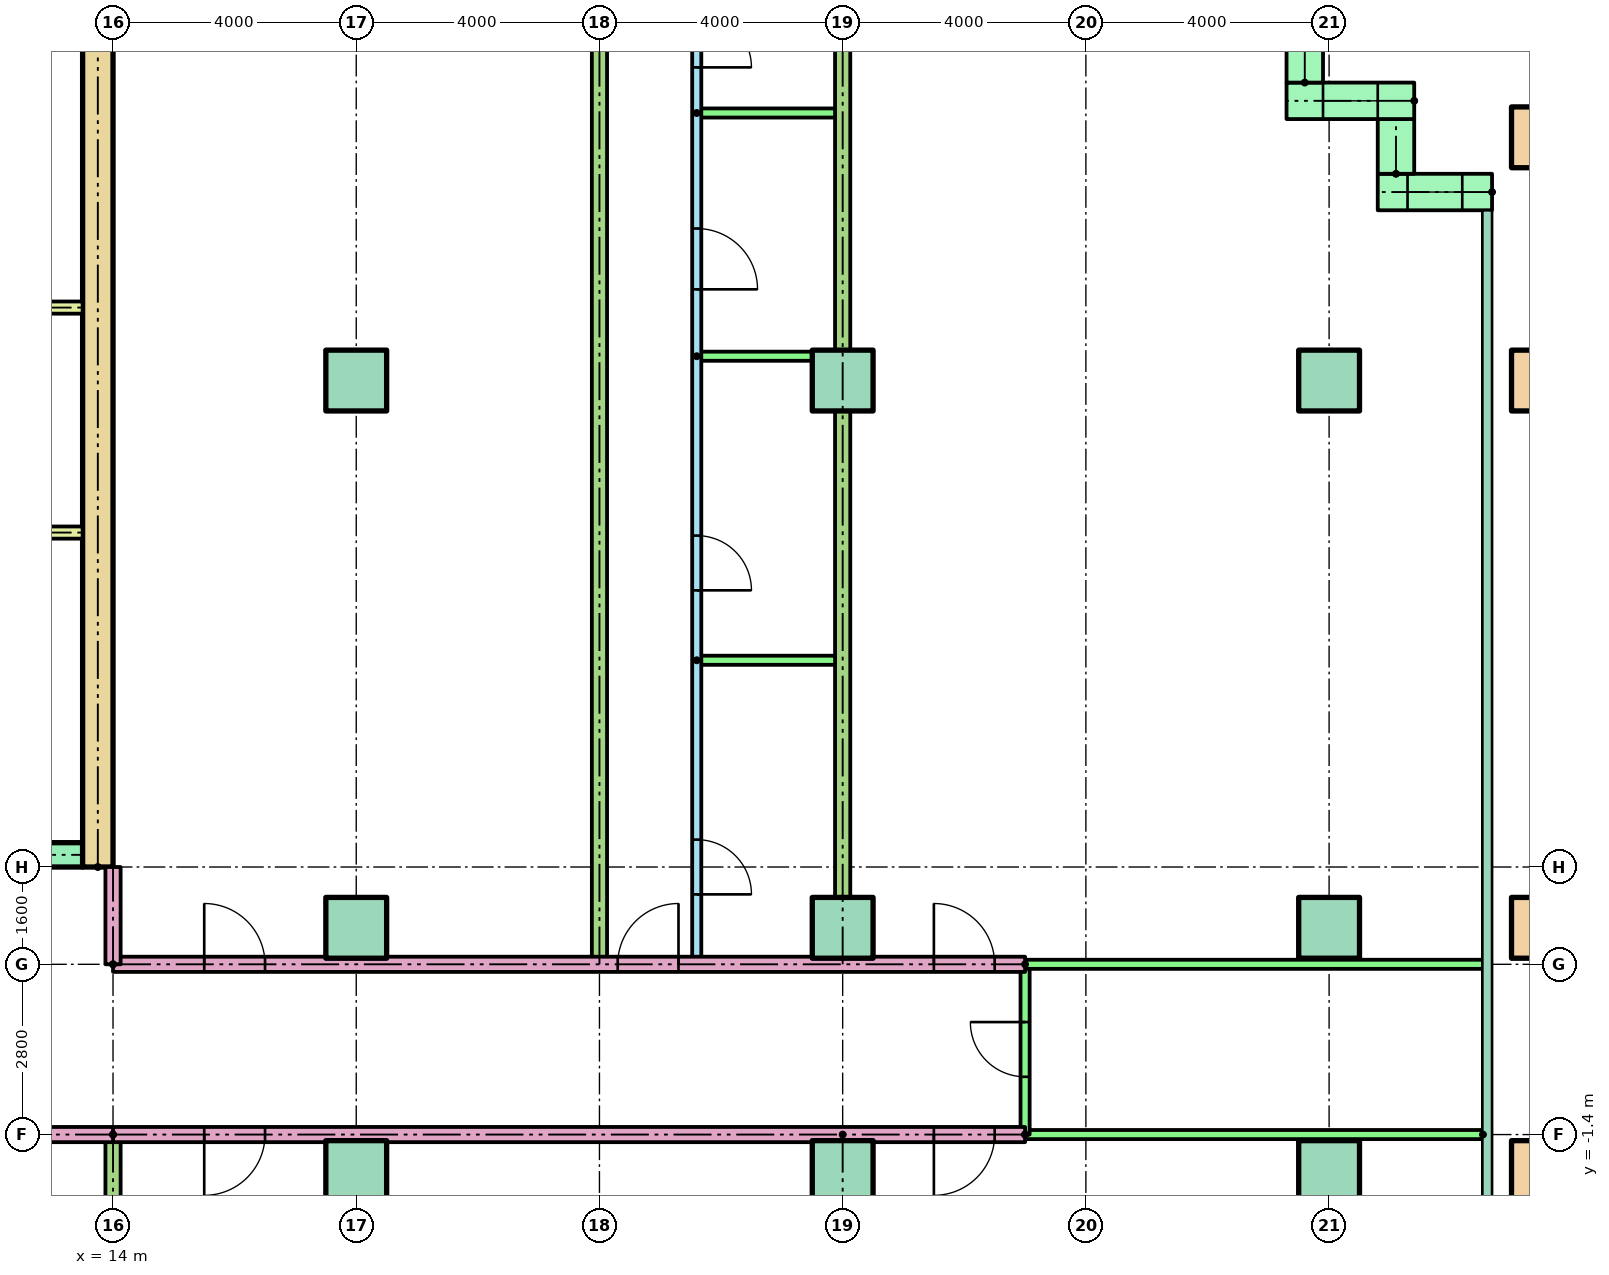
"""IFC4 building model, lengths in metres.
Left out: names, types, materials, properties, quantities, classifications, styles, units other than length and angle.
Written with IfcOpenShell. Run it as: python <this file> out.ifc"""

import sys

from ifc_helpers import new_model, si_unit, direction, frame, frame_2d, origin, origin_2d, place, context, subcontext, project, spatial, rectangle, hollow_rectangle, extrude, element, fill, save


model = new_model("IFC4")
c1 = context("Model", 3, precision=1e-05, world=origin(), true_north=direction((0.0, 1.0)))
c2 = subcontext(c1, "Body", "Model", "MODEL_VIEW")
j1 = project(units=[si_unit("LENGTHUNIT", "METRE"), si_unit("PLANEANGLEUNIT", "RADIAN")], contexts=[c1])
p1 = place(None, origin())
s1 = spatial("IfcSite", under=j1, at=p1, CompositionType="ELEMENT")
p2 = place(p1, origin())
s2 = spatial("IfcBuilding", under=s1, at=p2, CompositionType="ELEMENT")
p3 = place(p2, frame((0.0, 0.0, 33.8)))
s3 = spatial("IfcBuildingStorey", under=s2, at=p3, CompositionType="ELEMENT", Elevation=33.8)
for number, where in (
    (1, (18.0, -2.0, 0.0)),
    (2, (26.0, -2.0, 0.0)),
    (3, (34.0, -2.0, 0.0)),
):
    element("IfcColumn", number, at=place(p3, frame(where)), inside=s3, PredefinedType="COLUMN", context=c2, shape_type="SweptSolid", body=[
        extrude(rectangle(XDim=1.0, YDim=1.0, at=origin_2d()), origin(), (0.0, 0.0, 1.0), 3.9),
    ])
p4 = place(p3, frame((37.5, -2.0, 0.0)))
e4 = element("IfcColumn", 4, at=p4, inside=s3, PredefinedType="COLUMN", context=c2, shape_type="SweptSolid", body=[
    extrude(hollow_rectangle(XDim=1.0, YDim=1.0, WallThickness=0.05, at=origin_2d()), origin(), (0.0, 0.0, 1.0), 3.9),
])
for number, where in (
    (5, (18.0, 2.0, 0.0)),
    (6, (26.0, 2.0, 0.0)),
    (7, (34.0, 2.0, 0.0)),
):
    element("IfcColumn", number, at=place(p3, frame(where)), inside=s3, PredefinedType="COLUMN", context=c2, shape_type="SweptSolid", body=[
        extrude(rectangle(XDim=1.0, YDim=1.0, at=origin_2d()), origin(), (0.0, 0.0, 1.0), 3.9),
    ])
p5 = place(p3, frame((37.5, 2.0, 0.0)))
e8 = element("IfcColumn", 8, at=p5, inside=s3, PredefinedType="COLUMN", context=c2, shape_type="SweptSolid", body=[
    extrude(hollow_rectangle(XDim=1.0, YDim=1.0, WallThickness=0.05, at=origin_2d()), origin(), (0.0, 0.0, 1.0), 3.9),
])
for number, where in (
    (9, (18.0, 11.0, 0.0)),
    (10, (26.0, 11.0, 0.0)),
    (11, (34.0, 11.0, 0.0)),
):
    element("IfcColumn", number, at=place(p3, frame(where)), inside=s3, PredefinedType="COLUMN", context=c2, shape_type="SweptSolid", body=[
        extrude(rectangle(XDim=1.0, YDim=1.0, at=origin_2d()), origin(), (0.0, 0.0, 1.0), 3.9),
    ])
for number, where in (
    (12, (37.5, 11.0, 0.0)),
    (13, (37.5, 15.0, 0.0)),
):
    element("IfcColumn", number, at=place(p3, frame(where)), inside=s3, PredefinedType="COLUMN", context=c2, shape_type="SweptSolid", body=[
        extrude(hollow_rectangle(XDim=1.0, YDim=1.0, WallThickness=0.05, at=origin_2d()), origin(), (0.0, 0.0, 1.0), 3.9),
    ])
p6 = place(p3, frame((36.68, 14.1, 0.0), z_axis=(0.0, 0.0, 1.0), x_axis=(-1.0, 0.0, 0.0)))
e14 = element("IfcWall", 14, at=p6, inside=s3, PredefinedType="STANDARD", context=c2, shape_type="SweptSolid", body=[
    extrude(rectangle(XDim=1.88, YDim=0.6, at=frame_2d((0.94, 0.0))), origin(), (0.0, 0.0, 1.0), 3.6),
])
p7 = place(p6, frame((0.49, 0.0, 0.9)))
e15 = element("IfcOpeningElement", 15, at=p7, cuts=e14, PredefinedType="OPENING", context=c2, shape_type="SweptSolid", body=[
    extrude(rectangle(XDim=0.9, YDim=1.8, at=frame_2d((0.45, 0.9))), frame((0.0, 0.31, 0.0), z_axis=(0.0, -1.0, 0.0), x_axis=(1.0, 0.0, 0.0)), (0.0, 0.0, 1.0), 0.62),
])
p8 = place(p3, frame((35.1, 14.4, 0.0), z_axis=(0.0, 0.0, 1.0), x_axis=(0.0, 1.0, 0.0)))
e16 = element("IfcWall", 16, at=p8, inside=s3, PredefinedType="STANDARD", context=c2, shape_type="SweptSolid", body=[
    extrude(rectangle(XDim=0.9, YDim=0.6, at=frame_2d((0.45, 0.0))), origin(), (0.0, 0.0, 1.0), 3.6),
])
p9 = place(p3, frame((35.4, 15.6, 0.0), z_axis=(0.0, 0.0, 1.0), x_axis=(-1.0, 0.0, 0.0)))
e17 = element("IfcWall", 17, at=p9, inside=s3, PredefinedType="STANDARD", context=c2, shape_type="SweptSolid", body=[
    extrude(rectangle(XDim=2.1, YDim=0.6, at=frame_2d((1.05, 0.0))), origin(), (0.0, 0.0, 1.0), 3.6),
])
p10 = place(p9, frame((0.6, 0.0, 0.9)))
e18 = element("IfcOpeningElement", 18, at=p10, cuts=e17, PredefinedType="OPENING", context=c2, shape_type="SweptSolid", body=[
    extrude(rectangle(XDim=0.9, YDim=1.8, at=frame_2d((0.45, 0.9))), frame((0.0, 0.31, 0.0), z_axis=(0.0, -1.0, 0.0), x_axis=(1.0, 0.0, 0.0)), (0.0, 0.0, 1.0), 0.62),
])
p11 = place(p3, frame((33.6, 15.9, 0.0), z_axis=(0.0, 0.0, 1.0), x_axis=(0.0, 1.0, 0.0)))
e19 = element("IfcWall", 19, at=p11, inside=s3, PredefinedType="STANDARD", context=c2, shape_type="SweptSolid", body=[
    extrude(rectangle(XDim=0.9, YDim=0.6, at=frame_2d((0.45, 0.0))), origin(), (0.0, 0.0, 1.0), 3.6),
])
p12 = place(p3, frame((13.75, 3.0, 0.0), z_axis=(0.0, 0.0, 1.0), x_axis=(0.0, 1.0, 0.0)))
e20 = element("IfcWall", 20, at=p12, inside=s3, PredefinedType="SHEAR", context=c2, shape_type="SweptSolid", body=[
    extrude(rectangle(XDim=17.0, YDim=0.5, at=frame_2d((8.5, 0.0))), origin(), (0.0, 0.0, 1.0), 3.6),
])
p13 = place(p3, frame((-13.5, 3.2, 0.0)))
e21 = element("IfcWall", 21, at=p13, inside=s3, PredefinedType="SHEAR", context=c2, shape_type="SweptSolid", body=[
    extrude(rectangle(XDim=27.0, YDim=0.4, at=frame_2d((13.5, 0.0))), origin(), (0.0, 0.0, 1.0), 3.6),
])
p14 = place(p13, frame((6.861, 0.0, 0.0)))
e22 = element("IfcOpeningElement", 22, at=p14, cuts=e21, PredefinedType="OPENING", context=c2, shape_type="SweptSolid", body=[
    extrude(rectangle(XDim=1.1, YDim=2.1, at=frame_2d((0.55, 1.05))), frame((0.0, 0.21, 0.0), z_axis=(0.0, -1.0, 0.0), x_axis=(1.0, 0.0, 0.0)), (0.0, 0.0, 1.0), 0.42),
])
p15 = place(p13, frame((9.906, 0.0, 0.0)))
e23 = element("IfcOpeningElement", 23, at=p15, cuts=e21, PredefinedType="OPENING", context=c2, shape_type="SweptSolid", body=[
    extrude(rectangle(XDim=1.1, YDim=2.1, at=frame_2d((0.55, 1.05))), frame((0.0, 0.21, 0.0), z_axis=(0.0, -1.0, 0.0), x_axis=(1.0, 0.0, 0.0)), (0.0, 0.0, 1.0), 0.42),
])
p16 = place(p13, frame((15.994, 0.0, 0.0)))
e24 = element("IfcOpeningElement", 24, at=p16, cuts=e21, PredefinedType="OPENING", context=c2, shape_type="SweptSolid", body=[
    extrude(rectangle(XDim=1.1, YDim=2.1, at=frame_2d((0.55, 1.05))), frame((0.0, 0.21, 0.0), z_axis=(0.0, -1.0, 0.0), x_axis=(1.0, 0.0, 0.0)), (0.0, 0.0, 1.0), 0.42),
])
p17 = place(p13, frame((19.039, 0.0, 0.0)))
e25 = element("IfcOpeningElement", 25, at=p17, cuts=e21, PredefinedType="OPENING", context=c2, shape_type="SweptSolid", body=[
    extrude(rectangle(XDim=1.1, YDim=2.1, at=frame_2d((0.55, 1.05))), frame((0.0, 0.21, 0.0), z_axis=(0.0, -1.0, 0.0), x_axis=(1.0, 0.0, 0.0)), (0.0, 0.0, 1.0), 0.42),
])
p18 = place(p13, frame((12.6, 0.0, 0.0)))
e26 = element("IfcOpeningElement", 26, at=p18, cuts=e21, PredefinedType="OPENING", context=c2, shape_type="SweptSolid", body=[
    extrude(rectangle(XDim=1.8, YDim=2.1, at=frame_2d((0.9, 1.05))), frame((0.0, 0.21, 0.0), z_axis=(0.0, -1.0, 0.0), x_axis=(1.0, 0.0, 0.0)), (0.0, 0.0, 1.0), 0.42),
])
for number, where in (
    (27, (9.6, 8.5, 0.0)),
    (28, (9.6, 12.2, 0.0)),
):
    element("IfcWall", number, at=place(p3, frame(where)), inside=s3, PredefinedType="PARTITIONING", context=c2, shape_type="SweptSolid", body=[
        extrude(rectangle(XDim=3.9, YDim=0.2, at=frame_2d((1.95, 0.0))), origin(), (0.0, 0.0, 1.0), 3.6),
    ])
p19 = place(p3, frame((29.0, -1.4, 0.0), z_axis=(0.0, 0.0, 1.0), x_axis=(-1.0, 0.0, 0.0)))
e29 = element("IfcWall", 29, at=p19, inside=s3, PredefinedType="PARTITIONING", context=c2, shape_type="SweptSolid", body=[
    extrude(rectangle(XDim=15.0, YDim=0.25, at=frame_2d((7.5, 0.0))), origin(), (0.0, 0.0, 1.0), 3.1),
])
p20 = place(p19, frame((12.5, 0.0, 0.0)))
e30 = element("IfcOpeningElement", 30, at=p20, cuts=e29, PredefinedType="OPENING", context=c2, shape_type="SweptSolid", body=[
    extrude(rectangle(XDim=1.0, YDim=2.1, at=frame_2d((0.5, 1.05))), frame((0.0, 0.135, 0.0), z_axis=(0.0, -1.0, 0.0), x_axis=(1.0, 0.0, 0.0)), (0.0, 0.0, 1.0), 0.27),
])
p21 = place(p19, frame((0.5, 0.0, 0.0)))
e31 = element("IfcOpeningElement", 31, at=p21, cuts=e29, PredefinedType="OPENING", context=c2, shape_type="SweptSolid", body=[
    extrude(rectangle(XDim=1.0, YDim=2.1, at=frame_2d((0.5, 1.05))), frame((0.0, 0.135, 0.0), z_axis=(0.0, -1.0, 0.0), x_axis=(1.0, 0.0, 0.0)), (0.0, 0.0, 1.0), 0.27),
])
p22 = place(p3, frame((36.53, -1.4, 0.0), z_axis=(0.0, 0.0, 1.0), x_axis=(-1.0, 0.0, 0.0)))
e32 = element("IfcWall", 32, at=p22, inside=s3, PredefinedType="PARTITIONING", context=c2, shape_type="SweptSolid", body=[
    extrude(rectangle(XDim=7.53, YDim=0.15, at=frame_2d((3.765, 0.0))), origin(), (0.0, 0.0, 1.0), 3.1),
])
p23 = place(p3, frame((29.0, -1.4, 0.0), z_axis=(0.0, 0.0, 1.0), x_axis=(0.0, 1.0, 0.0)))
e33 = element("IfcWall", 33, at=p23, inside=s3, PredefinedType="PARTITIONING", context=c2, shape_type="SweptSolid", body=[
    extrude(rectangle(XDim=2.8, YDim=0.15, at=frame_2d((1.4, 0.0))), origin(), (0.0, 0.0, 1.0), 3.1),
])
p24 = place(p23, frame((0.95, 0.0, 0.0)))
e34 = element("IfcOpeningElement", 34, at=p24, cuts=e33, PredefinedType="OPENING", context=c2, shape_type="SweptSolid", body=[
    extrude(rectangle(XDim=0.9, YDim=2.1, at=frame_2d((0.45, 1.05))), frame((0.0, 0.085, 0.0), z_axis=(0.0, -1.0, 0.0), x_axis=(1.0, 0.0, 0.0)), (0.0, 0.0, 1.0), 0.17),
])
for number, where, z_axis, x_axis in (
    (35, (14.0, -1.4, 0.0), (0.0, 0.0, 1.0), (0.0, -1.0, 0.0)),
    (36, (26.0, -1.4, 0.0), (0.0, 0.0, 1.0), (0.0, -1.0, 0.0)),
):
    element("IfcWall", number, at=place(p3, frame(where, z_axis=z_axis, x_axis=x_axis)), inside=s3, PredefinedType="PARTITIONING", context=c2, shape_type="SweptSolid", body=[
        extrude(rectangle(XDim=14.721, YDim=0.25, at=frame_2d((7.361, 0.0))), origin(), (0.0, 0.0, 1.0), 3.1),
    ])
p25 = place(p3, frame((14.0, 1.4, 0.0)))
e37 = element("IfcWall", 37, at=p25, inside=s3, PredefinedType="PARTITIONING", context=c2, shape_type="SweptSolid", body=[
    extrude(rectangle(XDim=15.0, YDim=0.25, at=frame_2d((7.5, 0.0))), origin(), (0.0, 0.0, 1.0), 3.1),
])
p26 = place(p25, frame((1.5, 0.0, 0.0)))
e38 = element("IfcOpeningElement", 38, at=p26, cuts=e37, PredefinedType="OPENING", context=c2, shape_type="SweptSolid", body=[
    extrude(rectangle(XDim=1.0, YDim=2.1, at=frame_2d((0.5, 1.05))), frame((0.0, 0.135, 0.0), z_axis=(0.0, -1.0, 0.0), x_axis=(1.0, 0.0, 0.0)), (0.0, 0.0, 1.0), 0.27),
])
p27 = place(p25, frame((8.3, 0.0, 0.0)))
e39 = element("IfcOpeningElement", 39, at=p27, cuts=e37, PredefinedType="OPENING", context=c2, shape_type="SweptSolid", body=[
    extrude(rectangle(XDim=1.0, YDim=2.1, at=frame_2d((0.5, 1.05))), frame((0.0, 0.135, 0.0), z_axis=(0.0, -1.0, 0.0), x_axis=(1.0, 0.0, 0.0)), (0.0, 0.0, 1.0), 0.27),
])
p28 = place(p25, frame((13.5, 0.0, 0.0)))
e40 = element("IfcOpeningElement", 40, at=p28, cuts=e37, PredefinedType="OPENING", context=c2, shape_type="SweptSolid", body=[
    extrude(rectangle(XDim=1.0, YDim=2.1, at=frame_2d((0.5, 1.05))), frame((0.0, 0.135, 0.0), z_axis=(0.0, -1.0, 0.0), x_axis=(1.0, 0.0, 0.0)), (0.0, 0.0, 1.0), 0.27),
])
p29 = place(p3, frame((29.0, 1.4, 0.0)))
e41 = element("IfcWall", 41, at=p29, inside=s3, PredefinedType="PARTITIONING", context=c2, shape_type="SweptSolid", body=[
    extrude(rectangle(XDim=7.53, YDim=0.15, at=frame_2d((3.765, 0.0))), origin(), (0.0, 0.0, 1.0), 3.1),
])
p30 = place(p3, frame((23.6, 18.521, 0.0), z_axis=(0.0, 0.0, 1.0), x_axis=(0.0, -1.0, 0.0)))
e42 = element("IfcWall", 42, at=p30, inside=s3, PredefinedType="PARTITIONING", context=c2, shape_type="SweptSolid", body=[
    extrude(rectangle(XDim=17.121, YDim=0.15, at=frame_2d((8.561, 0.0))), origin(), (0.0, 0.0, 1.0), 3.1),
])
p31 = place(p30, frame((15.071, 0.0, 0.0)))
e43 = element("IfcOpeningElement", 43, at=p31, cuts=e42, PredefinedType="OPENING", context=c2, shape_type="SweptSolid", body=[
    extrude(rectangle(XDim=0.9, YDim=2.1, at=frame_2d((0.45, 1.05))), frame((0.0, 0.085, 0.0), z_axis=(0.0, -1.0, 0.0), x_axis=(1.0, 0.0, 0.0)), (0.0, 0.0, 1.0), 0.17),
])
p32 = place(p30, frame((10.071, 0.0, 0.0)))
e44 = element("IfcOpeningElement", 44, at=p32, cuts=e42, PredefinedType="OPENING", context=c2, shape_type="SweptSolid", body=[
    extrude(rectangle(XDim=0.9, YDim=2.1, at=frame_2d((0.45, 1.05))), frame((0.0, 0.085, 0.0), z_axis=(0.0, -1.0, 0.0), x_axis=(1.0, 0.0, 0.0)), (0.0, 0.0, 1.0), 0.17),
])
p33 = place(p30, frame((5.021, 0.0, 0.0)))
e45 = element("IfcOpeningElement", 45, at=p33, cuts=e42, PredefinedType="OPENING", context=c2, shape_type="SweptSolid", body=[
    extrude(rectangle(XDim=1.0, YDim=2.1, at=frame_2d((0.5, 1.05))), frame((0.0, 0.085, 0.0), z_axis=(0.0, -1.0, 0.0), x_axis=(1.0, 0.0, 0.0)), (0.0, 0.0, 1.0), 0.17),
])
p34 = place(p30, frame((1.471, 0.0, 0.0)))
e46 = element("IfcOpeningElement", 46, at=p34, cuts=e42, PredefinedType="OPENING", context=c2, shape_type="SweptSolid", body=[
    extrude(rectangle(XDim=0.9, YDim=2.1, at=frame_2d((0.45, 1.05))), frame((0.0, 0.085, 0.0), z_axis=(0.0, -1.0, 0.0), x_axis=(1.0, 0.0, 0.0)), (0.0, 0.0, 1.0), 0.17),
])
for number, where in (
    (47, (23.6, 6.4, 0.0)),
    (48, (23.6, 11.4, 0.0)),
    (49, (23.6, 15.4, 0.0)),
):
    element("IfcWall", number, at=place(p3, frame(where)), inside=s3, PredefinedType="PARTITIONING", context=c2, shape_type="SweptSolid", body=[
        extrude(rectangle(XDim=2.4, YDim=0.15, at=frame_2d((1.2, 0.0))), origin(), (0.0, 0.0, 1.0), 3.1),
    ])
for number, where, z_axis, x_axis in (
    (50, (22.0, 18.521, 0.0), (0.0, 0.0, 1.0), (0.0, -1.0, 0.0)),
    (51, (26.0, 18.521, 0.0), (0.0, 0.0, 1.0), (0.0, -1.0, 0.0)),
):
    element("IfcWall", number, at=place(p3, frame(where, z_axis=z_axis, x_axis=x_axis)), inside=s3, PredefinedType="PARTITIONING", context=c2, shape_type="SweptSolid", body=[
        extrude(rectangle(XDim=17.121, YDim=0.25, at=frame_2d((8.561, 0.0))), origin(), (0.0, 0.0, 1.0), 3.1),
    ])
p35 = place(p3, frame((14.0, -1.4, 0.0), z_axis=(0.0, 0.0, 1.0), x_axis=(-1.0, 0.0, 0.0)))
e52 = element("IfcWall", 52, at=p35, inside=s3, PredefinedType="PARTITIONING", context=c2, shape_type="SweptSolid", body=[
    extrude(rectangle(XDim=28.0, YDim=0.25, at=frame_2d((14.0, 0.0))), origin(), (0.0, 0.0, 1.0), 3.1),
])
p36 = place(p35, frame((17.5, 0.0, 0.0)))
e53 = element("IfcOpeningElement", 53, at=p36, cuts=e52, PredefinedType="OPENING", context=c2, shape_type="SweptSolid", body=[
    extrude(rectangle(XDim=1.0, YDim=2.1, at=frame_2d((0.5, 1.05))), frame((0.0, 0.135, 0.0), z_axis=(0.0, -1.0, 0.0), x_axis=(1.0, 0.0, 0.0)), (0.0, 0.0, 1.0), 0.27),
])
p37 = place(p35, frame((13.5, 0.0, 0.0)))
e54 = element("IfcOpeningElement", 54, at=p37, cuts=e52, PredefinedType="OPENING", context=c2, shape_type="SweptSolid", body=[
    extrude(rectangle(XDim=1.0, YDim=2.1, at=frame_2d((0.5, 1.05))), frame((0.0, 0.135, 0.0), z_axis=(0.0, -1.0, 0.0), x_axis=(1.0, 0.0, 0.0)), (0.0, 0.0, 1.0), 0.27),
])
p38 = place(p3, frame((14.0, 1.4, 0.0), z_axis=(0.0, 0.0, 1.0), x_axis=(0.0, 1.0, 0.0)))
e55 = element("IfcWall", 55, at=p38, inside=s3, PredefinedType="PARTITIONING", context=c2, shape_type="SweptSolid", body=[
    extrude(rectangle(XDim=1.6, YDim=0.25, at=frame_2d((0.8, 0.0))), origin(), (0.0, 0.0, 1.0), 3.1),
])
p39 = place(p7, origin())
e56 = element("IfcWindow", 56, at=p39, inside=s3, PartitioningType="SINGLE_PANEL", PredefinedType="WINDOW", context=c2, shape_type="SweptSolid", body=[
    extrude(rectangle(XDim=0.9, YDim=1.8, at=frame_2d((0.45, 0.9))), frame((0.0, 0.03, 0.0), z_axis=(0.0, -1.0, 0.0), x_axis=(1.0, 0.0, 0.0)), (0.0, 0.0, 1.0), 0.06),
])
fill(e15, e56)
p40 = place(p10, origin())
e57 = element("IfcWindow", 57, at=p40, inside=s3, PartitioningType="SINGLE_PANEL", PredefinedType="WINDOW", context=c2, shape_type="SweptSolid", body=[
    extrude(rectangle(XDim=0.9, YDim=1.8, at=frame_2d((0.45, 0.9))), frame((0.0, 0.03, 0.0), z_axis=(0.0, -1.0, 0.0), x_axis=(1.0, 0.0, 0.0)), (0.0, 0.0, 1.0), 0.06),
])
fill(e18, e57)
p41 = place(p20, origin())
e58 = element("IfcDoor", 58, at=p41, inside=s3, OperationType="SINGLE_SWING_RIGHT", PredefinedType="DOOR", context=c2, shape_type="SweptSolid", body=[
    extrude(rectangle(XDim=1.0, YDim=2.1, at=frame_2d((0.5, 1.05))), frame((0.0, 0.025, 0.0), z_axis=(0.0, -1.0, 0.0), x_axis=(1.0, 0.0, 0.0)), (0.0, 0.0, 1.0), 0.05),
])
fill(e30, e58)
p42 = place(p21, origin())
e59 = element("IfcDoor", 59, at=p42, inside=s3, OperationType="SINGLE_SWING_RIGHT", PredefinedType="DOOR", context=c2, shape_type="SweptSolid", body=[
    extrude(rectangle(XDim=1.0, YDim=2.1, at=frame_2d((0.5, 1.05))), frame((0.0, 0.025, 0.0), z_axis=(0.0, -1.0, 0.0), x_axis=(1.0, 0.0, 0.0)), (0.0, 0.0, 1.0), 0.05),
])
fill(e31, e59)
p43 = place(p24, origin())
e60 = element("IfcDoor", 60, at=p43, inside=s3, OperationType="SINGLE_SWING_RIGHT", PredefinedType="DOOR", context=c2, shape_type="SweptSolid", body=[
    extrude(rectangle(XDim=0.9, YDim=2.1, at=frame_2d((0.45, 1.05))), frame((0.0, 0.025, 0.0), z_axis=(0.0, -1.0, 0.0), x_axis=(1.0, 0.0, 0.0)), (0.0, 0.0, 1.0), 0.05),
])
fill(e34, e60)
p44 = place(p26, origin())
e61 = element("IfcDoor", 61, at=p44, inside=s3, OperationType="SINGLE_SWING_LEFT", PredefinedType="DOOR", context=c2, shape_type="SweptSolid", body=[
    extrude(rectangle(XDim=1.0, YDim=2.1, at=frame_2d((0.5, 1.05))), frame((0.0, 0.025, 0.0), z_axis=(0.0, -1.0, 0.0), x_axis=(1.0, 0.0, 0.0)), (0.0, 0.0, 1.0), 0.05),
])
fill(e38, e61)
p45 = place(p31, origin())
e62 = element("IfcDoor", 62, at=p45, inside=s3, OperationType="SINGLE_SWING_RIGHT", PredefinedType="DOOR", context=c2, shape_type="SweptSolid", body=[
    extrude(rectangle(XDim=0.9, YDim=2.1, at=frame_2d((0.45, 1.05))), frame((0.0, 0.025, 0.0), z_axis=(0.0, -1.0, 0.0), x_axis=(1.0, 0.0, 0.0)), (0.0, 0.0, 1.0), 0.05),
])
fill(e43, e62)
p46 = place(p32, origin())
e63 = element("IfcDoor", 63, at=p46, inside=s3, OperationType="SINGLE_SWING_RIGHT", PredefinedType="DOOR", context=c2, shape_type="SweptSolid", body=[
    extrude(rectangle(XDim=0.9, YDim=2.1, at=frame_2d((0.45, 1.05))), frame((0.0, 0.025, 0.0), z_axis=(0.0, -1.0, 0.0), x_axis=(1.0, 0.0, 0.0)), (0.0, 0.0, 1.0), 0.05),
])
fill(e44, e63)
p47 = place(p33, origin())
e64 = element("IfcDoor", 64, at=p47, inside=s3, OperationType="SINGLE_SWING_RIGHT", PredefinedType="DOOR", context=c2, shape_type="SweptSolid", body=[
    extrude(rectangle(XDim=1.0, YDim=2.1, at=frame_2d((0.5, 1.05))), frame((0.0, 0.025, 0.0), z_axis=(0.0, -1.0, 0.0), x_axis=(1.0, 0.0, 0.0)), (0.0, 0.0, 1.0), 0.05),
])
fill(e45, e64)
p48 = place(p34, origin())
e65 = element("IfcDoor", 65, at=p48, inside=s3, OperationType="SINGLE_SWING_RIGHT", PredefinedType="DOOR", context=c2, shape_type="SweptSolid", body=[
    extrude(rectangle(XDim=0.9, YDim=2.1, at=frame_2d((0.45, 1.05))), frame((0.0, 0.025, 0.0), z_axis=(0.0, -1.0, 0.0), x_axis=(1.0, 0.0, 0.0)), (0.0, 0.0, 1.0), 0.05),
])
fill(e46, e65)
p49 = place(p27, origin())
e66 = element("IfcDoor", 66, at=p49, inside=s3, OperationType="SINGLE_SWING_RIGHT", PredefinedType="DOOR", context=c2, shape_type="SweptSolid", body=[
    extrude(rectangle(XDim=1.0, YDim=2.1, at=frame_2d((0.5, 1.05))), frame((0.0, 0.025, 0.0), z_axis=(0.0, -1.0, 0.0), x_axis=(1.0, 0.0, 0.0)), (0.0, 0.0, 1.0), 0.05),
])
fill(e39, e66)
p50 = place(p28, origin())
e67 = element("IfcDoor", 67, at=p50, inside=s3, OperationType="SINGLE_SWING_LEFT", PredefinedType="DOOR", context=c2, shape_type="SweptSolid", body=[
    extrude(rectangle(XDim=1.0, YDim=2.1, at=frame_2d((0.5, 1.05))), frame((0.0, 0.025, 0.0), z_axis=(0.0, -1.0, 0.0), x_axis=(1.0, 0.0, 0.0)), (0.0, 0.0, 1.0), 0.05),
])
fill(e40, e67)
save(model, sys.argv[1])
